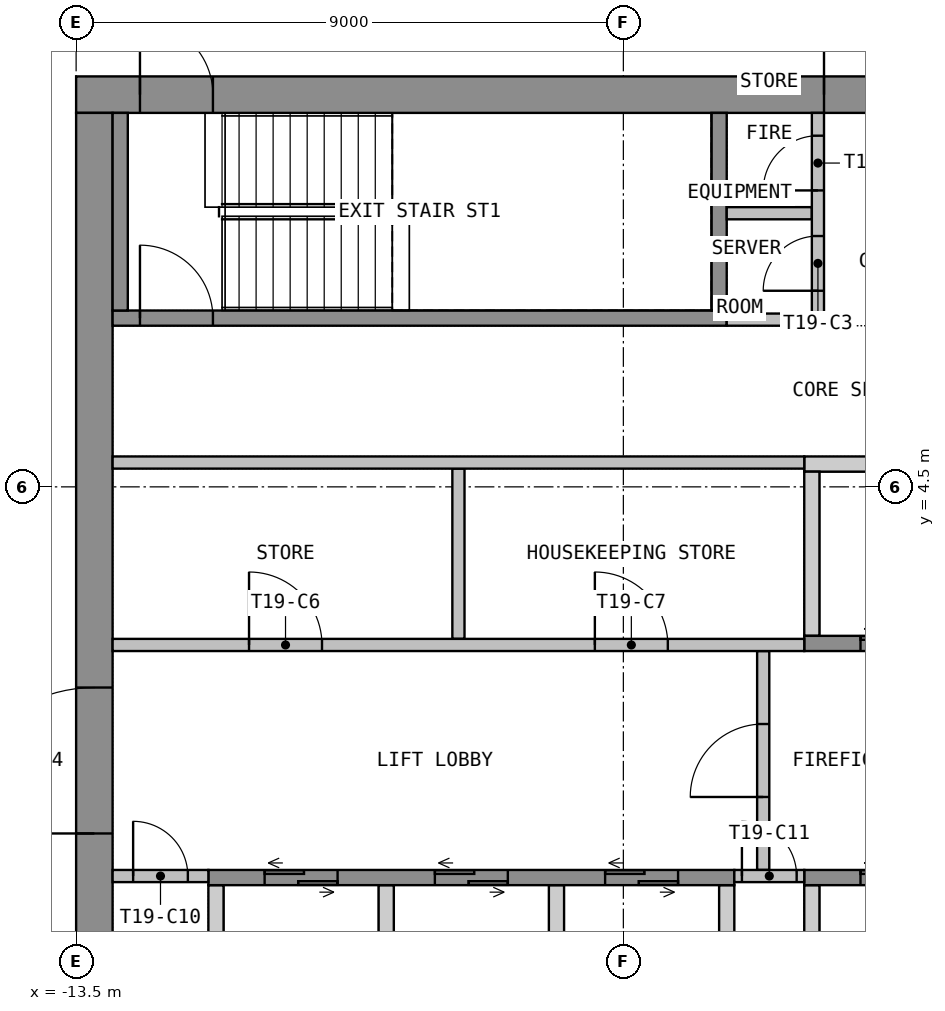
"""IFC4 building model, lengths in metres.
Left out: names, types, materials, properties, quantities, classifications, styles, units other than length and angle.
Written with IfcOpenShell. Run it as: python <this file> out.ifc"""

import sys

from ifc_helpers import new_model, si_unit, direction, frame, frame_2d, origin, place, context, subcontext, project, spatial, polyline, rectangle, outline, extrude, element, fill, save


model = new_model("IFC4")
c1 = context("Model", 3, precision=1e-05, world=origin(), true_north=direction((0.0, 1.0)))
c2 = subcontext(c1, "Body", "Model", "MODEL_VIEW")
j1 = project(units=[si_unit("LENGTHUNIT", "METRE"), si_unit("PLANEANGLEUNIT", "RADIAN")], contexts=[c1])
p1 = place(None, origin())
s1 = spatial("IfcSite", under=j1, at=p1, CompositionType="ELEMENT")
p2 = place(p1, origin())
s2 = spatial("IfcBuilding", under=s1, at=p2, CompositionType="ELEMENT")
p3 = place(p2, frame((0.0, 0.0, 258.6)))
s3 = spatial("IfcBuildingStorey", under=s2, at=p3, CompositionType="ELEMENT", Elevation=258.6)
p4 = place(p3, frame((-13.5, 10.95, 0.0), z_axis=(0.0, 0.0, 1.0), x_axis=(1.0, 0.0, 0.0)))
e1 = element("IfcWall", 1, at=p4, inside=s3, PredefinedType="SHEAR", context=c2, shape_type="SweptSolid", body=[
    extrude(rectangle(XDim=27.0, YDim=0.6, at=frame_2d((13.5, 0.0))), origin(), (0.0, 0.0, 1.0), 3.575),
])
p5 = place(p4, frame((12.3, 0.0, 0.0)))
e2 = element("IfcOpeningElement", 2, at=p5, cuts=e1, PredefinedType="OPENING", context=c2, shape_type="SweptSolid", body=[
    extrude(rectangle(XDim=2.4, YDim=2.1, at=frame_2d((1.2, 1.05))), frame((0.0, 0.31, 0.0), z_axis=(0.0, -1.0, 0.0), x_axis=(1.0, 0.0, 0.0)), (0.0, 0.0, 1.0), 0.62),
])
p6 = place(p4, frame((1.05, 0.0, 0.0)))
e3 = element("IfcOpeningElement", 3, at=p6, cuts=e1, PredefinedType="OPENING", context=c2, shape_type="SweptSolid", body=[
    extrude(rectangle(XDim=1.2, YDim=2.1, at=frame_2d((0.6, 1.05))), frame((0.0, 0.31, 0.0), z_axis=(0.0, -1.0, 0.0), x_axis=(1.0, 0.0, 0.0)), (0.0, 0.0, 1.0), 0.62),
])
p7 = place(p4, frame((24.75, 0.0, 0.0)))
e4 = element("IfcOpeningElement", 4, at=p7, cuts=e1, PredefinedType="OPENING", context=c2, shape_type="SweptSolid", body=[
    extrude(rectangle(XDim=1.2, YDim=2.1, at=frame_2d((0.6, 1.05))), frame((0.0, 0.31, 0.0), z_axis=(0.0, -1.0, 0.0), x_axis=(1.0, 0.0, 0.0)), (0.0, 0.0, 1.0), 0.62),
])
p8 = place(p3, frame((-13.2, -10.65, 0.0), z_axis=(0.0, 0.0, 1.0), x_axis=(0.0, 1.0, 0.0)))
e5 = element("IfcWall", 5, at=p8, inside=s3, PredefinedType="SHEAR", context=c2, shape_type="SweptSolid", body=[
    extrude(rectangle(XDim=21.3, YDim=0.6, at=frame_2d((10.65, 0.0))), origin(), (0.0, 0.0, 1.0), 3.575),
])
p9 = place(p8, frame((9.45, 0.0, 0.0)))
e6 = element("IfcOpeningElement", 6, at=p9, cuts=e5, PredefinedType="OPENING", context=c2, shape_type="SweptSolid", body=[
    extrude(rectangle(XDim=2.4, YDim=2.1, at=frame_2d((1.2, 1.05))), frame((0.0, 0.31, 0.0), z_axis=(0.0, -1.0, 0.0), x_axis=(1.0, 0.0, 0.0)), (0.0, 0.0, 1.0), 0.62),
])
p10 = place(p3, origin())
e7 = element("IfcWall", 7, at=p10, inside=s3, PredefinedType="SHEAR", context=c2, shape_type="SweptSolid", body=[
    extrude(outline(polyline([(-1.525, 4.75), (1.525, 4.75), (1.525, 5.0), (-1.525, 5.0), (-1.525, 4.75)])), origin(), (0.0, 0.0, 1.0), 3.575),
])
p11 = place(p3, origin())
e8 = element("IfcWall", 8, at=p11, inside=s3, PredefinedType="SHEAR", context=c2, shape_type="SweptSolid", body=[
    extrude(outline(polyline([(-1.525, 2.05), (-1.275, 2.05), (-1.275, 4.75), (-1.525, 4.75), (-1.525, 2.05)])), origin(), (0.0, 0.0, 1.0), 3.575),
])
p12 = place(p3, frame((-1.525, 1.925, 0.0), z_axis=(0.0, 0.0, 1.0), x_axis=(1.0, 0.0, 0.0)))
e9 = element("IfcWall", 9, at=p12, inside=s3, PredefinedType="SHEAR", context=c2, shape_type="SweptSolid", body=[
    extrude(rectangle(XDim=3.05, YDim=0.25, at=frame_2d((1.525, 0.0))), origin(), (0.0, 0.0, 1.0), 3.575),
])
p13 = place(p12, frame((0.925, 0.0, 0.0)))
e10 = element("IfcOpeningElement", 10, at=p13, cuts=e9, PredefinedType="OPENING", context=c2, shape_type="SweptSolid", body=[
    extrude(rectangle(XDim=1.2, YDim=2.1, at=frame_2d((0.6, 1.05))), frame((0.0, 0.135, 0.0), z_axis=(0.0, -1.0, 0.0), x_axis=(1.0, 0.0, 0.0)), (0.0, 0.0, 1.0), 0.27),
])
p14 = place(p3, origin())
e11 = element("IfcWall", 11, at=p14, inside=s3, PredefinedType="SHEAR", context=c2, shape_type="SweptSolid", body=[
    extrude(outline(polyline([(-11.325, -4.75), (-11.075, -4.75), (-11.075, -2.05), (-11.325, -2.05), (-11.325, -4.75)])), origin(), (0.0, 0.0, 1.0), 3.575),
])
p15 = place(p3, origin())
e12 = element("IfcWall", 12, at=p15, inside=s3, PredefinedType="SHEAR", context=c2, shape_type="SweptSolid", body=[
    extrude(outline(polyline([(-8.525, -4.75), (-8.275, -4.75), (-8.275, -2.05), (-8.525, -2.05), (-8.525, -4.75)])), origin(), (0.0, 0.0, 1.0), 3.575),
])
p16 = place(p3, origin())
e13 = element("IfcWall", 13, at=p16, inside=s3, PredefinedType="SHEAR", context=c2, shape_type="SweptSolid", body=[
    extrude(outline(polyline([(-5.725, -4.75), (-5.475, -4.75), (-5.475, -2.05), (-5.725, -2.05), (-5.725, -4.75)])), origin(), (0.0, 0.0, 1.0), 3.575),
])
p17 = place(p3, origin())
e14 = element("IfcWall", 14, at=p17, inside=s3, PredefinedType="SHEAR", context=c2, shape_type="SweptSolid", body=[
    extrude(outline(polyline([(-2.925, -4.75), (-2.675, -4.75), (-2.675, -2.05), (-2.925, -2.05), (-2.925, -4.75)])), origin(), (0.0, 0.0, 1.0), 3.575),
])
p18 = place(p3, origin())
e15 = element("IfcWall", 15, at=p18, inside=s3, PredefinedType="SHEAR", context=c2, shape_type="SweptSolid", body=[
    extrude(outline(polyline([(-1.525, -4.75), (-1.275, -4.75), (-1.275, -2.05), (-1.525, -2.05), (-1.525, -4.75)])), origin(), (0.0, 0.0, 1.0), 3.575),
])
p19 = place(p3, frame((-11.325, -1.925, 0.0), z_axis=(0.0, 0.0, 1.0), x_axis=(1.0, 0.0, 0.0)))
e16 = element("IfcWall", 16, at=p19, inside=s3, PredefinedType="SHEAR", context=c2, shape_type="SweptSolid", body=[
    extrude(rectangle(XDim=8.65, YDim=0.25, at=frame_2d((4.325, 0.0))), origin(), (0.0, 0.0, 1.0), 3.575),
])
p20 = place(p19, frame((0.925, 0.0, 0.0)))
e17 = element("IfcOpeningElement", 17, at=p20, cuts=e16, PredefinedType="OPENING", context=c2, shape_type="SweptSolid", body=[
    extrude(rectangle(XDim=1.2, YDim=2.1, at=frame_2d((0.6, 1.05))), frame((0.0, 0.135, 0.0), z_axis=(0.0, -1.0, 0.0), x_axis=(1.0, 0.0, 0.0)), (0.0, 0.0, 1.0), 0.27),
])
p21 = place(p19, frame((3.725, 0.0, 0.0)))
e18 = element("IfcOpeningElement", 18, at=p21, cuts=e16, PredefinedType="OPENING", context=c2, shape_type="SweptSolid", body=[
    extrude(rectangle(XDim=1.2, YDim=2.1, at=frame_2d((0.6, 1.05))), frame((0.0, 0.135, 0.0), z_axis=(0.0, -1.0, 0.0), x_axis=(1.0, 0.0, 0.0)), (0.0, 0.0, 1.0), 0.27),
])
p22 = place(p19, frame((6.525, 0.0, 0.0)))
e19 = element("IfcOpeningElement", 19, at=p22, cuts=e16, PredefinedType="OPENING", context=c2, shape_type="SweptSolid", body=[
    extrude(rectangle(XDim=1.2, YDim=2.1, at=frame_2d((0.6, 1.05))), frame((0.0, 0.135, 0.0), z_axis=(0.0, -1.0, 0.0), x_axis=(1.0, 0.0, 0.0)), (0.0, 0.0, 1.0), 0.27),
])
p23 = place(p3, frame((-1.525, -1.925, 0.0), z_axis=(0.0, 0.0, 1.0), x_axis=(1.0, 0.0, 0.0)))
e20 = element("IfcWall", 20, at=p23, inside=s3, PredefinedType="SHEAR", context=c2, shape_type="SweptSolid", body=[
    extrude(rectangle(XDim=5.85, YDim=0.25, at=frame_2d((2.925, 0.0))), origin(), (0.0, 0.0, 1.0), 3.575),
])
p24 = place(p23, frame((0.925, 0.0, 0.0)))
e21 = element("IfcOpeningElement", 21, at=p24, cuts=e20, PredefinedType="OPENING", context=c2, shape_type="SweptSolid", body=[
    extrude(rectangle(XDim=1.2, YDim=2.1, at=frame_2d((0.6, 1.05))), frame((0.0, 0.135, 0.0), z_axis=(0.0, -1.0, 0.0), x_axis=(1.0, 0.0, 0.0)), (0.0, 0.0, 1.0), 0.27),
])
p25 = place(p23, frame((3.725, 0.0, 0.0)))
e22 = element("IfcOpeningElement", 22, at=p25, cuts=e20, PredefinedType="OPENING", context=c2, shape_type="SweptSolid", body=[
    extrude(rectangle(XDim=1.2, YDim=2.1, at=frame_2d((0.6, 1.05))), frame((0.0, 0.135, 0.0), z_axis=(0.0, -1.0, 0.0), x_axis=(1.0, 0.0, 0.0)), (0.0, 0.0, 1.0), 0.27),
])
p26 = place(p3, frame((-2.2, -1.8, 0.0), z_axis=(0.0, 0.0, 1.0), x_axis=(0.0, 1.0, 0.0)))
e23 = element("IfcWall", 23, at=p26, inside=s3, PredefinedType="PARTITIONING", context=c2, shape_type="SweptSolid", body=[
    extrude(rectangle(XDim=3.6, YDim=0.2, at=frame_2d((1.8, 0.0))), origin(), (0.0, 0.0, 1.0), 3.575),
])
p27 = place(p26, frame((1.2, 0.0, 0.0)))
e24 = element("IfcOpeningElement", 24, at=p27, cuts=e23, PredefinedType="OPENING", context=c2, shape_type="SweptSolid", body=[
    extrude(rectangle(XDim=1.2, YDim=2.1, at=frame_2d((0.6, 1.05))), frame((0.0, 0.11, 0.0), z_axis=(0.0, -1.0, 0.0), x_axis=(1.0, 0.0, 0.0)), (0.0, 0.0, 1.0), 0.22),
])
p28 = place(p3, frame((-12.9, 7.275, 0.0), z_axis=(0.0, 0.0, 1.0), x_axis=(1.0, 0.0, 0.0)))
e25 = element("IfcWall", 25, at=p28, inside=s3, PredefinedType="SHEAR", context=c2, shape_type="SweptSolid", body=[
    extrude(rectangle(XDim=10.1, YDim=0.25, at=frame_2d((5.05, 0.0))), origin(), (0.0, 0.0, 1.0), 3.575),
])
p29 = place(p28, frame((0.45, 0.0, 0.0)))
e26 = element("IfcOpeningElement", 26, at=p29, cuts=e25, PredefinedType="OPENING", context=c2, shape_type="SweptSolid", body=[
    extrude(rectangle(XDim=1.2, YDim=2.1, at=frame_2d((0.6, 1.05))), frame((0.0, 0.135, 0.0), z_axis=(0.0, -1.0, 0.0), x_axis=(1.0, 0.0, 0.0)), (0.0, 0.0, 1.0), 0.27),
])
for number, where, z_axis, x_axis in (
    (27, (-12.775, 7.4, 0.0), (0.0, 0.0, 1.0), (0.0, 1.0, 0.0)),
    (28, (-2.925, 7.4, 0.0), (0.0, 0.0, 1.0), (0.0, 1.0, 0.0)),
):
    element("IfcWall", number, at=place(p3, frame(where, z_axis=z_axis, x_axis=x_axis)), inside=s3, PredefinedType="SHEAR", context=c2, shape_type="SweptSolid", body=[
        extrude(rectangle(XDim=3.25, YDim=0.25, at=frame_2d((1.625, 0.0))), origin(), (0.0, 0.0, 1.0), 3.575),
    ])
for number, where, z_axis, x_axis in (
    (29, (-2.8, 7.25, 0.0), (0.0, 0.0, 1.0), (1.0, 0.0, 0.0)),
    (30, (-2.8, 9.0, 0.0), (0.0, 0.0, 1.0), (1.0, 0.0, 0.0)),
):
    element("IfcWall", number, at=place(p3, frame(where, z_axis=z_axis, x_axis=x_axis)), inside=s3, PredefinedType="PARTITIONING", context=c2, shape_type="SweptSolid", body=[
        extrude(rectangle(XDim=1.4, YDim=0.2, at=frame_2d((0.7, 0.0))), origin(), (0.0, 0.0, 1.0), 3.575),
    ])
p30 = place(p3, frame((-1.3, 7.15, 0.0), z_axis=(0.0, 0.0, 1.0), x_axis=(0.0, 1.0, 0.0)))
e31 = element("IfcWall", 31, at=p30, inside=s3, PredefinedType="PARTITIONING", context=c2, shape_type="SweptSolid", body=[
    extrude(rectangle(XDim=3.5, YDim=0.2, at=frame_2d((1.75, 0.0))), origin(), (0.0, 0.0, 1.0), 3.575),
])
p31 = place(p30, frame((0.575, 0.0, 0.0)))
e32 = element("IfcOpeningElement", 32, at=p31, cuts=e31, PredefinedType="OPENING", context=c2, shape_type="SweptSolid", body=[
    extrude(rectangle(XDim=0.9, YDim=2.1, at=frame_2d((0.45, 1.05))), frame((0.0, 0.11, 0.0), z_axis=(0.0, -1.0, 0.0), x_axis=(1.0, 0.0, 0.0)), (0.0, 0.0, 1.0), 0.22),
])
p32 = place(p30, frame((2.225, 0.0, 0.0)))
e33 = element("IfcOpeningElement", 33, at=p32, cuts=e31, PredefinedType="OPENING", context=c2, shape_type="SweptSolid", body=[
    extrude(rectangle(XDim=0.9, YDim=2.1, at=frame_2d((0.45, 1.05))), frame((0.0, 0.11, 0.0), z_axis=(0.0, -1.0, 0.0), x_axis=(1.0, 0.0, 0.0)), (0.0, 0.0, 1.0), 0.22),
])
p33 = place(p3, frame((-7.212, 2.0, 0.0), z_axis=(0.0, 0.0, 1.0), x_axis=(0.0, 1.0, 0.0)))
e34 = element("IfcWall", 34, at=p33, inside=s3, PredefinedType="PARTITIONING", context=c2, shape_type="SweptSolid", body=[
    extrude(rectangle(XDim=2.8, YDim=0.2, at=frame_2d((1.4, 0.0))), origin(), (0.0, 0.0, 1.0), 3.575),
])
p34 = place(p3, frame((-12.9, 1.9, 0.0), z_axis=(0.0, 0.0, 1.0), x_axis=(1.0, 0.0, 0.0)))
e35 = element("IfcWall", 35, at=p34, inside=s3, PredefinedType="PARTITIONING", context=c2, shape_type="SweptSolid", body=[
    extrude(rectangle(XDim=11.375, YDim=0.2, at=frame_2d((5.688, 0.0))), origin(), (0.0, 0.0, 1.0), 3.575),
])
p35 = place(p34, frame((2.244, 0.0, 0.0)))
e36 = element("IfcOpeningElement", 36, at=p35, cuts=e35, PredefinedType="OPENING", context=c2, shape_type="SweptSolid", body=[
    extrude(rectangle(XDim=1.2, YDim=2.1, at=frame_2d((0.6, 1.05))), frame((0.0, 0.11, 0.0), z_axis=(0.0, -1.0, 0.0), x_axis=(1.0, 0.0, 0.0)), (0.0, 0.0, 1.0), 0.22),
])
p36 = place(p34, frame((7.931, 0.0, 0.0)))
e37 = element("IfcOpeningElement", 37, at=p36, cuts=e35, PredefinedType="OPENING", context=c2, shape_type="SweptSolid", body=[
    extrude(rectangle(XDim=1.2, YDim=2.1, at=frame_2d((0.6, 1.05))), frame((0.0, 0.11, 0.0), z_axis=(0.0, -1.0, 0.0), x_axis=(1.0, 0.0, 0.0)), (0.0, 0.0, 1.0), 0.22),
])
p37 = place(p3, frame((-12.9, 4.9, 0.0), z_axis=(0.0, 0.0, 1.0), x_axis=(1.0, 0.0, 0.0)))
e38 = element("IfcWall", 38, at=p37, inside=s3, PredefinedType="PARTITIONING", context=c2, shape_type="SweptSolid", body=[
    extrude(rectangle(XDim=11.375, YDim=0.2, at=frame_2d((5.688, 0.0))), origin(), (0.0, 0.0, 1.0), 3.575),
])
p38 = place(p3, frame((-12.9, -1.9, 0.0), z_axis=(0.0, 0.0, 1.0), x_axis=(1.0, 0.0, 0.0)))
e39 = element("IfcWall", 39, at=p38, inside=s3, PredefinedType="PARTITIONING", context=c2, shape_type="SweptSolid", body=[
    extrude(rectangle(XDim=1.575, YDim=0.2, at=frame_2d((0.788, 0.0))), origin(), (0.0, 0.0, 1.0), 3.575),
])
p39 = place(p38, frame((0.337, 0.0, 0.0)))
e40 = element("IfcOpeningElement", 40, at=p39, cuts=e39, PredefinedType="OPENING", context=c2, shape_type="SweptSolid", body=[
    extrude(rectangle(XDim=0.9, YDim=2.1, at=frame_2d((0.45, 1.05))), frame((0.0, 0.11, 0.0), z_axis=(0.0, -1.0, 0.0), x_axis=(1.0, 0.0, 0.0)), (0.0, 0.0, 1.0), 0.22),
])
p40 = place(p3, frame((-2.675, -1.9, 0.0), z_axis=(0.0, 0.0, 1.0), x_axis=(1.0, 0.0, 0.0)))
e41 = element("IfcWall", 41, at=p40, inside=s3, PredefinedType="PARTITIONING", context=c2, shape_type="SweptSolid", body=[
    extrude(rectangle(XDim=1.15, YDim=0.2, at=frame_2d((0.575, 0.0))), origin(), (0.0, 0.0, 1.0), 3.575),
])
p41 = place(p40, frame((0.125, 0.0, 0.0)))
e42 = element("IfcOpeningElement", 42, at=p41, cuts=e41, PredefinedType="OPENING", context=c2, shape_type="SweptSolid", body=[
    extrude(rectangle(XDim=0.9, YDim=2.1, at=frame_2d((0.45, 1.05))), frame((0.0, 0.11, 0.0), z_axis=(0.0, -1.0, 0.0), x_axis=(1.0, 0.0, 0.0)), (0.0, 0.0, 1.0), 0.22),
])
p42 = place(p9, origin())
e43 = element("IfcDoor", 43, at=p42, inside=s3, OperationType="DOUBLE_DOOR_DOUBLE_SWING", PredefinedType="DOOR", context=c2, shape_type="SweptSolid", body=[
    extrude(rectangle(XDim=2.4, YDim=2.1, at=frame_2d((1.2, 1.05))), frame((0.0, 0.025, 0.0), z_axis=(0.0, -1.0, 0.0), x_axis=(1.0, 0.0, 0.0)), (0.0, 0.0, 1.0), 0.05),
])
fill(e6, e43)
p43 = place(p5, origin())
e44 = element("IfcDoor", 44, at=p43, inside=s3, OperationType="DOUBLE_DOOR_DOUBLE_SWING", PredefinedType="DOOR", context=c2, shape_type="SweptSolid", body=[
    extrude(rectangle(XDim=2.4, YDim=2.1, at=frame_2d((1.2, 1.05))), frame((0.0, 0.025, 0.0), z_axis=(0.0, -1.0, 0.0), x_axis=(1.0, 0.0, 0.0)), (0.0, 0.0, 1.0), 0.05),
])
fill(e2, e44)
p44 = place(p6, origin())
e45 = element("IfcDoor", 45, at=p44, inside=s3, OperationType="SINGLE_SWING_RIGHT", PredefinedType="DOOR", context=c2, shape_type="SweptSolid", body=[
    extrude(rectangle(XDim=1.2, YDim=2.1, at=frame_2d((0.6, 1.05))), frame((0.0, 0.025, 0.0), z_axis=(0.0, -1.0, 0.0), x_axis=(1.0, 0.0, 0.0)), (0.0, 0.0, 1.0), 0.05),
])
fill(e3, e45)
p45 = place(p13, origin())
e46 = element("IfcDoor", 46, at=p45, inside=s3, OperationType="DOUBLE_DOOR_SLIDING", PredefinedType="DOOR", context=c2, shape_type="SweptSolid", body=[
    extrude(rectangle(XDim=1.2, YDim=2.1, at=frame_2d((0.6, 1.05))), frame((0.0, 0.025, 0.0), z_axis=(0.0, -1.0, 0.0), x_axis=(1.0, 0.0, 0.0)), (0.0, 0.0, 1.0), 0.05),
])
fill(e10, e46)
p46 = place(p20, origin())
e47 = element("IfcDoor", 47, at=p46, inside=s3, OperationType="DOUBLE_DOOR_SLIDING", PredefinedType="DOOR", context=c2, shape_type="SweptSolid", body=[
    extrude(rectangle(XDim=1.2, YDim=2.1, at=frame_2d((0.6, 1.05))), frame((0.0, 0.025, 0.0), z_axis=(0.0, -1.0, 0.0), x_axis=(1.0, 0.0, 0.0)), (0.0, 0.0, 1.0), 0.05),
])
fill(e17, e47)
p47 = place(p21, origin())
e48 = element("IfcDoor", 48, at=p47, inside=s3, OperationType="DOUBLE_DOOR_SLIDING", PredefinedType="DOOR", context=c2, shape_type="SweptSolid", body=[
    extrude(rectangle(XDim=1.2, YDim=2.1, at=frame_2d((0.6, 1.05))), frame((0.0, 0.025, 0.0), z_axis=(0.0, -1.0, 0.0), x_axis=(1.0, 0.0, 0.0)), (0.0, 0.0, 1.0), 0.05),
])
fill(e18, e48)
p48 = place(p22, origin())
e49 = element("IfcDoor", 49, at=p48, inside=s3, OperationType="DOUBLE_DOOR_SLIDING", PredefinedType="DOOR", context=c2, shape_type="SweptSolid", body=[
    extrude(rectangle(XDim=1.2, YDim=2.1, at=frame_2d((0.6, 1.05))), frame((0.0, 0.025, 0.0), z_axis=(0.0, -1.0, 0.0), x_axis=(1.0, 0.0, 0.0)), (0.0, 0.0, 1.0), 0.05),
])
fill(e19, e49)
p49 = place(p24, origin())
e50 = element("IfcDoor", 50, at=p49, inside=s3, OperationType="DOUBLE_DOOR_SLIDING", PredefinedType="DOOR", context=c2, shape_type="SweptSolid", body=[
    extrude(rectangle(XDim=1.2, YDim=2.1, at=frame_2d((0.6, 1.05))), frame((0.0, 0.025, 0.0), z_axis=(0.0, -1.0, 0.0), x_axis=(1.0, 0.0, 0.0)), (0.0, 0.0, 1.0), 0.05),
])
fill(e21, e50)
p50 = place(p27, origin())
e51 = element("IfcDoor", 51, at=p50, inside=s3, OperationType="SINGLE_SWING_LEFT", PredefinedType="DOOR", context=c2, shape_type="SweptSolid", body=[
    extrude(rectangle(XDim=1.2, YDim=2.1, at=frame_2d((0.6, 1.05))), frame((0.0, 0.025, 0.0), z_axis=(0.0, -1.0, 0.0), x_axis=(1.0, 0.0, 0.0)), (0.0, 0.0, 1.0), 0.05),
])
fill(e24, e51)
p51 = place(p29, origin())
e52 = element("IfcDoor", 52, at=p51, inside=s3, OperationType="SINGLE_SWING_LEFT", PredefinedType="DOOR", context=c2, shape_type="SweptSolid", body=[
    extrude(rectangle(XDim=1.2, YDim=2.1, at=frame_2d((0.6, 1.05))), frame((0.0, 0.025, 0.0), z_axis=(0.0, -1.0, 0.0), x_axis=(1.0, 0.0, 0.0)), (0.0, 0.0, 1.0), 0.05),
])
fill(e26, e52)
p52 = place(p31, origin())
e53 = element("IfcDoor", 53, at=p52, inside=s3, OperationType="SINGLE_SWING_LEFT", PredefinedType="DOOR", context=c2, shape_type="SweptSolid", body=[
    extrude(rectangle(XDim=0.9, YDim=2.1, at=frame_2d((0.45, 1.05))), frame((0.0, 0.025, 0.0), z_axis=(0.0, -1.0, 0.0), x_axis=(1.0, 0.0, 0.0)), (0.0, 0.0, 1.0), 0.05),
])
fill(e32, e53)
p53 = place(p32, origin())
e54 = element("IfcDoor", 54, at=p53, inside=s3, OperationType="SINGLE_SWING_LEFT", PredefinedType="DOOR", context=c2, shape_type="SweptSolid", body=[
    extrude(rectangle(XDim=0.9, YDim=2.1, at=frame_2d((0.45, 1.05))), frame((0.0, 0.025, 0.0), z_axis=(0.0, -1.0, 0.0), x_axis=(1.0, 0.0, 0.0)), (0.0, 0.0, 1.0), 0.05),
])
fill(e33, e54)
p54 = place(p35, origin())
e55 = element("IfcDoor", 55, at=p54, inside=s3, OperationType="SINGLE_SWING_RIGHT", PredefinedType="DOOR", context=c2, shape_type="SweptSolid", body=[
    extrude(rectangle(XDim=1.2, YDim=2.1, at=frame_2d((0.6, 1.05))), frame((0.0, 0.025, 0.0), z_axis=(0.0, -1.0, 0.0), x_axis=(1.0, 0.0, 0.0)), (0.0, 0.0, 1.0), 0.05),
])
fill(e36, e55)
p55 = place(p36, origin())
e56 = element("IfcDoor", 56, at=p55, inside=s3, OperationType="SINGLE_SWING_RIGHT", PredefinedType="DOOR", context=c2, shape_type="SweptSolid", body=[
    extrude(rectangle(XDim=1.2, YDim=2.1, at=frame_2d((0.6, 1.05))), frame((0.0, 0.025, 0.0), z_axis=(0.0, -1.0, 0.0), x_axis=(1.0, 0.0, 0.0)), (0.0, 0.0, 1.0), 0.05),
])
fill(e37, e56)
p56 = place(p39, origin())
e57 = element("IfcDoor", 57, at=p56, inside=s3, OperationType="SINGLE_SWING_LEFT", PredefinedType="DOOR", context=c2, shape_type="SweptSolid", body=[
    extrude(rectangle(XDim=0.9, YDim=2.1, at=frame_2d((0.45, 1.05))), frame((0.0, 0.025, 0.0), z_axis=(0.0, -1.0, 0.0), x_axis=(1.0, 0.0, 0.0)), (0.0, 0.0, 1.0), 0.05),
])
fill(e40, e57)
p57 = place(p41, origin())
e58 = element("IfcDoor", 58, at=p57, inside=s3, OperationType="SINGLE_SWING_LEFT", PredefinedType="DOOR", context=c2, shape_type="SweptSolid", body=[
    extrude(rectangle(XDim=0.9, YDim=2.1, at=frame_2d((0.45, 1.05))), frame((0.0, 0.025, 0.0), z_axis=(0.0, -1.0, 0.0), x_axis=(1.0, 0.0, 0.0)), (0.0, 0.0, 1.0), 0.05),
])
fill(e42, e58)
save(model, sys.argv[1])
